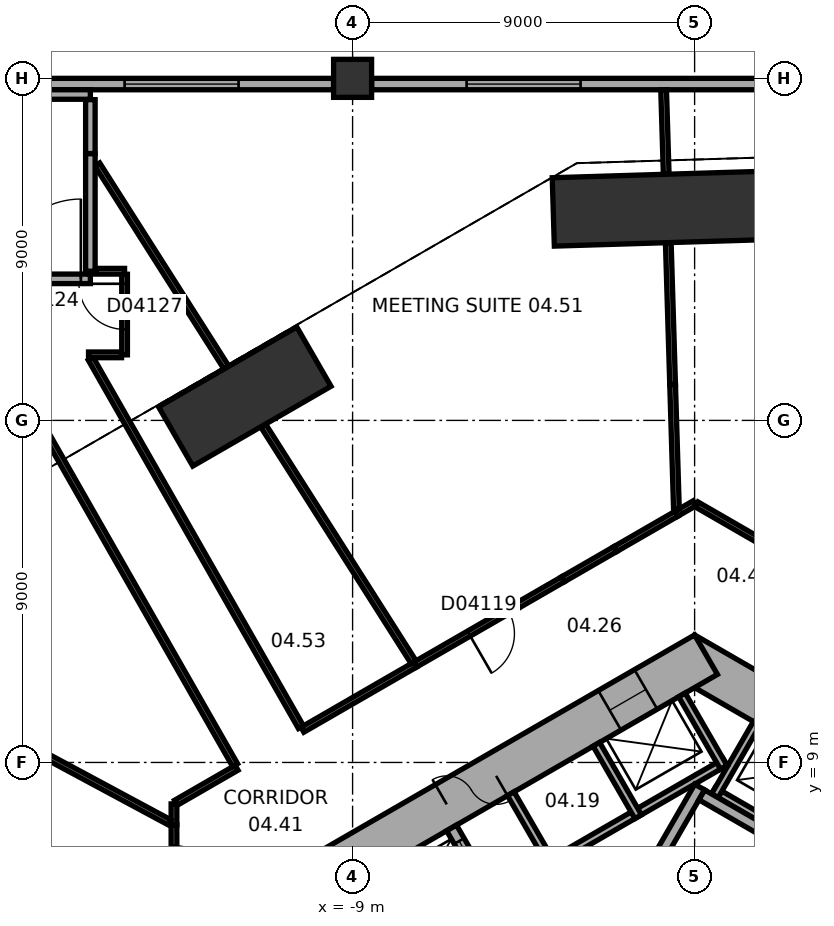
"""IFC4 building model, lengths in metres.
Left out: names, types, materials, properties, quantities, classifications, styles, units other than length and angle.
Written with IfcOpenShell. Run it as: python <this file> out.ifc"""

import sys

from ifc_helpers import new_model, si_unit, direction, frame, frame_2d, origin, origin_2d, place, context, subcontext, project, spatial, rectangle, extrude, element, fill, save


model = new_model("IFC4")
c1 = context("Model", 3, precision=1e-05, world=origin(), true_north=direction((0.0, 1.0)))
c2 = subcontext(c1, "Body", "Model", "MODEL_VIEW")
j1 = project(units=[si_unit("LENGTHUNIT", "METRE"), si_unit("PLANEANGLEUNIT", "RADIAN")], contexts=[c1])
p1 = place(None, origin())
s1 = spatial("IfcSite", under=j1, at=p1, CompositionType="ELEMENT")
p2 = place(p1, origin())
s2 = spatial("IfcBuilding", under=s1, at=p2, CompositionType="ELEMENT")
p3 = place(p2, frame((0.0, 0.0, 29.0)))
s3 = spatial("IfcBuildingStorey", under=s2, at=p3, CompositionType="ELEMENT", Elevation=29.0)
p4 = place(p3, frame((-0.72, 23.577, 0.0), z_axis=(0.0, 0.0, 1.0), x_axis=(-0.999533644135, -0.030536768695, 0.0)))
e1 = element("IfcColumn", 1, at=p4, inside=s3, PredefinedType="COLUMN", context=c2, shape_type="SweptSolid", body=[
    extrude(rectangle(XDim=6.0, YDim=1.8, at=origin_2d()), origin(), (0.0, 0.0, 1.0), 5.5),
])
p5 = place(p3, frame((-11.837, 18.627, 0.0), z_axis=(0.0, 0.0, 1.0), x_axis=(-0.866028021766, -0.499995465495, 0.0)))
e2 = element("IfcColumn", 2, at=p5, inside=s3, PredefinedType="COLUMN", context=c2, shape_type="SweptSolid", body=[
    extrude(rectangle(XDim=4.2, YDim=1.8, at=origin_2d()), origin(), (0.0, 0.0, 1.0), 5.5),
])
p6 = place(p3, frame((-9.0, 27.0, 0.0), z_axis=(0.0, 0.0, 1.0), x_axis=(1.0, 0.0, 0.0)))
e3 = element("IfcColumn", 3, at=p6, inside=s3, PredefinedType="COLUMN", context=c2, shape_type="SweptSolid", body=[
    extrude(rectangle(XDim=1.0, YDim=1.0, at=origin_2d()), origin(), (0.0, 0.0, 1.0), 5.5),
])
p7 = place(p3, frame((10.4, 5.658, 0.0), z_axis=(0.0, 0.0, 1.0), x_axis=(-0.866021384402, 0.500006961711, 0.0)))
e4 = element("IfcWall", 4, at=p7, inside=s3, PredefinedType="SHEAR", context=c2, shape_type="SweptSolid", body=[
    extrude(rectangle(XDim=12.355, YDim=1.2, at=frame_2d((6.178, 0.0))), origin(), (0.0, 0.0, 1.0), 5.5),
])
p8 = place(p7, frame((2.728, 0.0, 0.0)))
e5 = element("IfcOpeningElement", 5, at=p8, cuts=e4, PredefinedType="OPENING", context=c2, shape_type="SweptSolid", body=[
    extrude(rectangle(XDim=1.1, YDim=2.1, at=frame_2d((0.55, 1.05))), frame((0.0, 0.61, 0.0), z_axis=(0.0, -1.0, 0.0), x_axis=(1.0, 0.0, 0.0)), (0.0, 0.0, 1.0), 1.22),
])
p9 = place(p7, frame((5.328, 0.0, 0.0)))
e6 = element("IfcOpeningElement", 6, at=p9, cuts=e4, PredefinedType="OPENING", context=c2, shape_type="SweptSolid", body=[
    extrude(rectangle(XDim=1.1, YDim=2.1, at=frame_2d((0.55, 1.05))), frame((0.0, 0.61, 0.0), z_axis=(0.0, -1.0, 0.0), x_axis=(1.0, 0.0, 0.0)), (0.0, 0.0, 1.0), 1.22),
])
p10 = place(p7, frame((7.928, 0.0, 0.0)))
e7 = element("IfcOpeningElement", 7, at=p10, cuts=e4, PredefinedType="OPENING", context=c2, shape_type="SweptSolid", body=[
    extrude(rectangle(XDim=1.1, YDim=2.1, at=frame_2d((0.55, 1.05))), frame((0.0, 0.61, 0.0), z_axis=(0.0, -1.0, 0.0), x_axis=(1.0, 0.0, 0.0)), (0.0, 0.0, 1.0), 1.22),
])
p11 = place(p3, frame((0.3, 11.836, 0.0), z_axis=(0.0, 0.0, 1.0), x_axis=(-0.866021384402, -0.500006961711, 0.0)))
e8 = element("IfcWall", 8, at=p11, inside=s3, PredefinedType="SHEAR", context=c2, shape_type="SweptSolid", body=[
    extrude(rectangle(XDim=12.355, YDim=1.2, at=frame_2d((6.178, 0.0))), origin(), (0.0, 0.0, 1.0), 5.5),
])
p12 = place(p11, frame((6.378, 0.0, 0.0)))
e9 = element("IfcOpeningElement", 9, at=p12, cuts=e8, PredefinedType="OPENING", context=c2, shape_type="SweptSolid", body=[
    extrude(rectangle(XDim=1.5, YDim=2.1, at=frame_2d((0.75, 1.05))), frame((0.0, 0.61, 0.0), z_axis=(0.0, -1.0, 0.0), x_axis=(1.0, 0.0, 0.0)), (0.0, 0.0, 1.0), 1.22),
])
p13 = place(p11, frame((1.828, 0.0, 0.0)))
e10 = element("IfcOpeningElement", 10, at=p13, cuts=e8, PredefinedType="OPENING", context=c2, shape_type="SweptSolid", body=[
    extrude(rectangle(XDim=1.1, YDim=2.1, at=frame_2d((0.55, 1.05))), frame((0.0, 0.61, 0.0), z_axis=(0.0, -1.0, 0.0), x_axis=(1.0, 0.0, 0.0)), (0.0, 0.0, 1.0), 1.22),
])
p14 = place(p3, frame((8.5, 26.85, 0.0), z_axis=(0.0, 0.0, 1.0), x_axis=(-1.0, 0.0, 0.0)))
e11 = element("IfcWall", 11, at=p14, inside=s3, PredefinedType="STANDARD", context=c2, shape_type="SweptSolid", body=[
    extrude(rectangle(XDim=17.0, YDim=0.3, at=frame_2d((8.5, 0.0))), origin(), (0.0, 0.0, 1.0), 3.95),
])
p15 = place(p14, frame((2.5, 0.0, 1.0)))
e12 = element("IfcOpeningElement", 12, at=p15, cuts=e11, PredefinedType="OPENING", context=c2, shape_type="SweptSolid", body=[
    extrude(rectangle(XDim=3.0, YDim=2.6, at=frame_2d((1.5, 1.3))), frame((0.0, 0.16, 0.0), z_axis=(0.0, -1.0, 0.0), x_axis=(1.0, 0.0, 0.0)), (0.0, 0.0, 1.0), 0.32),
])
p16 = place(p14, frame((11.5, 0.0, 1.0)))
e13 = element("IfcOpeningElement", 13, at=p16, cuts=e11, PredefinedType="OPENING", context=c2, shape_type="SweptSolid", body=[
    extrude(rectangle(XDim=3.0, YDim=2.6, at=frame_2d((1.5, 1.3))), frame((0.0, 0.16, 0.0), z_axis=(0.0, -1.0, 0.0), x_axis=(1.0, 0.0, 0.0)), (0.0, 0.0, 1.0), 0.32),
])
p17 = place(p3, frame((-9.5, 26.85, 0.0), z_axis=(0.0, 0.0, 1.0), x_axis=(-1.0, 0.0, 0.0)))
e14 = element("IfcWall", 14, at=p17, inside=s3, PredefinedType="STANDARD", context=c2, shape_type="SweptSolid", body=[
    extrude(rectangle(XDim=17.0, YDim=0.3, at=frame_2d((8.5, 0.0))), origin(), (0.0, 0.0, 1.0), 3.95),
])
p18 = place(p17, frame((2.5, 0.0, 1.0)))
e15 = element("IfcOpeningElement", 15, at=p18, cuts=e14, PredefinedType="OPENING", context=c2, shape_type="SweptSolid", body=[
    extrude(rectangle(XDim=3.0, YDim=2.6, at=frame_2d((1.5, 1.3))), frame((0.0, 0.16, 0.0), z_axis=(0.0, -1.0, 0.0), x_axis=(1.0, 0.0, 0.0)), (0.0, 0.0, 1.0), 0.32),
])
p19 = place(p17, frame((11.5, 0.0, 1.0)))
e16 = element("IfcOpeningElement", 16, at=p19, cuts=e14, PredefinedType="OPENING", context=c2, shape_type="SweptSolid", body=[
    extrude(rectangle(XDim=3.0, YDim=2.6, at=frame_2d((1.5, 1.3))), frame((0.0, 0.16, 0.0), z_axis=(0.0, -1.0, 0.0), x_axis=(1.0, 0.0, 0.0)), (0.0, 0.0, 1.0), 0.32),
])
p20 = place(p3, frame((7.424, 4.259, 0.0), z_axis=(0.0, 0.0, 1.0), x_axis=(-0.866026010844, 0.49999894854, 0.0)))
e17 = element("IfcWall", 17, at=p20, inside=s3, PredefinedType="PARTITIONING", context=c2, shape_type="SweptSolid", body=[
    extrude(rectangle(XDim=8.0, YDim=0.2, at=frame_2d((4.0, 0.0))), origin(), (0.0, 0.0, 1.0), 5.15),
])
p21 = place(p3, frame((0.532, 8.122, 0.0), z_axis=(0.0, 0.0, 1.0), x_axis=(0.500077893725, 0.86598042715, 0.0)))
e18 = element("IfcWall", 18, at=p21, inside=s3, PredefinedType="PARTITIONING", context=c2, shape_type="SweptSolid", body=[
    extrude(rectangle(XDim=2.2, YDim=0.2, at=frame_2d((1.1, 0.0))), origin(), (0.0, 0.0, 1.0), 5.15),
])
p22 = place(p3, frame((0.803, 9.009, 0.0), z_axis=(0.0, 0.0, 1.0), x_axis=(-0.866028230842, -0.499995103361, 0.0)))
e19 = element("IfcWall", 19, at=p22, inside=s3, PredefinedType="PARTITIONING", context=c2, shape_type="SweptSolid", body=[
    extrude(rectangle(XDim=5.4, YDim=0.2, at=frame_2d((2.7, 0.0))), origin(), (0.0, 0.0, 1.0), 5.15),
])
p23 = place(p3, frame((0.767, 8.872, 0.0), z_axis=(0.0, 0.0, 1.0), x_axis=(-0.499994660107, 0.866028486751, 0.0)))
e20 = element("IfcWall", 20, at=p23, inside=s3, PredefinedType="PARTITIONING", context=c2, shape_type="SweptSolid", body=[
    extrude(rectangle(XDim=2.2, YDim=0.2, at=frame_2d((1.1, 0.0))), origin(), (0.0, 0.0, 1.0), 5.15),
])
for number, where, z_axis, x_axis in (
    (21, (-1.485, 7.572, 0.0), (0.0, 0.0, 1.0), (-0.5, 0.866, 0.0)),
    (22, (-3.737, 6.272, 0.0), (0.0, 0.0, 1.0), (-0.5, 0.866, 0.0)),
):
    element("IfcWall", number, at=place(p3, frame(where, z_axis=z_axis, x_axis=x_axis)), inside=s3, PredefinedType="PARTITIONING", context=c2, shape_type="SweptSolid", body=[
        extrude(rectangle(XDim=2.2, YDim=0.2, at=frame_2d((1.1, 0.0))), origin(), (0.0, 0.0, 1.0), 5.15),
    ])
p24 = place(p3, frame((-2.216, 4.282, 0.0), z_axis=(0.0, 0.0, 1.0), x_axis=(0.499977259774, 0.866038532462, 0.0)))
e23 = element("IfcWall", 23, at=p24, inside=s3, PredefinedType="SHEAR", context=c2, shape_type="SweptSolid", body=[
    extrude(rectangle(XDim=4.7, YDim=0.3, at=frame_2d((2.35, 0.0))), origin(), (0.0, 0.0, 1.0), 5.15),
])
p25 = place(p3, frame((6.303, 4.617, 0.0), z_axis=(0.0, 0.0, 1.0), x_axis=(-0.866027801685, 0.499995846692, 0.0)))
e24 = element("IfcWall", 24, at=p25, inside=s3, PredefinedType="SHEAR", context=c2, shape_type="SweptSolid", body=[
    extrude(rectangle(XDim=7.06, YDim=0.3, at=frame_2d((3.53, 0.0))), origin(), (0.0, 0.0, 1.0), 5.15),
])
p26 = place(p3, frame((-5.295, 5.372, 0.0), z_axis=(0.0, 0.0, 1.0), x_axis=(-0.500077893725, 0.86598042715, 0.0)))
e25 = element("IfcWall", 25, at=p26, inside=s3, PredefinedType="SHEAR", context=c2, shape_type="SweptSolid", body=[
    extrude(rectangle(XDim=2.2, YDim=0.3, at=frame_2d((1.1, 0.0))), origin(), (0.0, 0.0, 1.0), 5.15),
])
p27 = place(p26, frame((0.7, 0.0, 0.0)))
e26 = element("IfcOpeningElement", 26, at=p27, cuts=e25, PredefinedType="OPENING", context=c2, shape_type="SweptSolid", body=[
    extrude(rectangle(XDim=1.1, YDim=2.1, at=frame_2d((0.55, 1.05))), frame((0.0, 0.16, 0.0), z_axis=(0.0, -1.0, 0.0), x_axis=(1.0, 0.0, 0.0)), (0.0, 0.0, 1.0), 0.32),
])
p28 = place(p3, frame((-13.7, -0.255, 0.0), z_axis=(0.0, 0.0, 1.0), x_axis=(0.0, 1.0, 0.0)))
e27 = element("IfcWall", 27, at=p28, inside=s3, PredefinedType="PARTITIONING", context=c2, shape_type="SweptSolid", body=[
    extrude(rectangle(XDim=7.616, YDim=0.15, at=frame_2d((3.808, 0.0))), origin(), (0.0, 0.0, 1.0), 5.15),
])
p29 = place(p28, frame((5.866, 0.0, 0.0)))
e28 = element("IfcOpeningElement", 28, at=p29, cuts=e27, PredefinedType="OPENING", context=c2, shape_type="SweptSolid", body=[
    extrude(rectangle(XDim=1.2, YDim=2.1, at=frame_2d((0.6, 1.05))), frame((0.0, 0.085, 0.0), z_axis=(0.0, -1.0, 0.0), x_axis=(1.0, 0.0, 0.0)), (0.0, 0.0, 1.0), 0.17),
])
p30 = place(p3, frame((-13.7, 7.362, 0.0), z_axis=(0.0, 0.0, 1.0), x_axis=(0.0, 1.0, 0.0)))
e29 = element("IfcWall", 29, at=p30, inside=s3, PredefinedType="PARTITIONING", context=c2, shape_type="SweptSolid", body=[
    extrude(rectangle(XDim=0.548, YDim=0.15, at=frame_2d((0.274, 0.0))), origin(), (0.0, 0.0, 1.0), 5.15),
])
p31 = place(p3, frame((-13.806, 7.418, 0.0), z_axis=(0.0, 0.0, 1.0), x_axis=(-0.880891557551, 0.473318142305, 0.0)))
e30 = element("IfcWall", 30, at=p31, inside=s3, PredefinedType="PARTITIONING", context=c2, shape_type="SweptSolid", body=[
    extrude(rectangle(XDim=7.787, YDim=0.15, at=frame_2d((3.894, 0.0))), origin(), (0.0, 0.0, 1.0), 5.15),
])
p32 = place(p3, frame((-13.648, 7.939, 0.0), z_axis=(0.0, 0.0, 1.0), x_axis=(0.866024486176, 0.500001589341, 0.0)))
e31 = element("IfcWall", 31, at=p32, inside=s3, PredefinedType="PARTITIONING", context=c2, shape_type="SweptSolid", body=[
    extrude(rectangle(XDim=1.842, YDim=0.15, at=frame_2d((0.921, 0.0))), origin(), (0.0, 0.0, 1.0), 5.15),
])
p33 = place(p3, frame((-12.092, 8.93, 0.0), z_axis=(0.0, 0.0, 1.0), x_axis=(-0.495564220718, 0.868571299977, 0.0)))
e32 = element("IfcWall", 32, at=p33, inside=s3, PredefinedType="PARTITIONING", context=c2, shape_type="SweptSolid", body=[
    extrude(rectangle(XDim=11.988, YDim=0.15, at=frame_2d((5.994, 0.0))), origin(), (0.0, 0.0, 1.0), 5.15),
])
p34 = place(p3, frame((-10.321, 9.861, 0.0), z_axis=(0.0, 0.0, 1.0), x_axis=(0.865970719175, 0.500094704563, 0.0)))
e33 = element("IfcWall", 33, at=p34, inside=s3, PredefinedType="PARTITIONING", context=c2, shape_type="SweptSolid", body=[
    extrude(rectangle(XDim=3.425, YDim=0.15, at=frame_2d((1.712, 0.0))), origin(), (0.0, 0.0, 1.0), 5.15),
])
p35 = place(p3, frame((-7.354, 11.573, 0.0), z_axis=(0.0, 0.0, 1.0), x_axis=(0.866051051954, 0.499955573435, 0.0)))
e34 = element("IfcWall", 34, at=p35, inside=s3, PredefinedType="PARTITIONING", context=c2, shape_type="SweptSolid", body=[
    extrude(rectangle(XDim=3.082, YDim=0.15, at=frame_2d((1.541, 0.0))), origin(), (0.0, 0.0, 1.0), 5.15),
])
p36 = place(p35, frame((1.632, 0.0, 0.0)))
e35 = element("IfcOpeningElement", 35, at=p36, cuts=e34, PredefinedType="OPENING", context=c2, shape_type="SweptSolid", body=[
    extrude(rectangle(XDim=1.2, YDim=2.1, at=frame_2d((0.6, 1.05))), frame((0.0, 0.085, 0.0), z_axis=(0.0, -1.0, 0.0), x_axis=(1.0, 0.0, 0.0)), (0.0, 0.0, 1.0), 0.17),
])
p37 = place(p3, frame((-7.397, 11.641, 0.0), z_axis=(0.0, 0.0, 1.0), x_axis=(-0.536312130721, 0.844019726334, 0.0)))
e36 = element("IfcWall", 36, at=p37, inside=s3, PredefinedType="PARTITIONING", context=c2, shape_type="SweptSolid", body=[
    extrude(rectangle(XDim=7.376, YDim=0.15, at=frame_2d((3.688, 0.0))), origin(), (0.0, 0.0, 1.0), 5.15),
])
p38 = place(p3, frame((-3.46, 13.822, 0.0), z_axis=(0.0, 0.0, 1.0), x_axis=(-0.866004557827, -0.500036104519, 0.0)))
e37 = element("IfcWall", 37, at=p38, inside=s3, PredefinedType="PARTITIONING", context=c2, shape_type="SweptSolid", body=[
    extrude(rectangle(XDim=1.415, YDim=0.15, at=frame_2d((0.708, 0.0))), origin(), (0.0, 0.0, 1.0), 5.15),
])
p39 = place(p3, frame((3.386, 13.865, 0.0), z_axis=(0.0, 0.0, 1.0), x_axis=(-0.866006051527, 0.500033517596, 0.0)))
e38 = element("IfcWall", 38, at=p39, inside=s3, PredefinedType="PARTITIONING", context=c2, shape_type="SweptSolid", body=[
    extrude(rectangle(XDim=3.85, YDim=0.15, at=frame_2d((1.925, 0.0))), origin(), (0.0, 0.0, 1.0), 5.15),
])
p40 = place(p3, frame((-2.087, 14.615, 0.0), z_axis=(0.0, 0.0, 1.0), x_axis=(-0.866054784643, -0.499949107407, 0.0)))
e39 = element("IfcWall", 39, at=p40, inside=s3, PredefinedType="PARTITIONING", context=c2, shape_type="SweptSolid", body=[
    extrude(rectangle(XDim=1.585, YDim=0.15, at=frame_2d((0.792, 0.0))), origin(), (0.0, 0.0, 1.0), 5.15),
])
p41 = place(p3, frame((-2.087, 14.615, 0.0), z_axis=(0.0, 0.0, 1.0), x_axis=(0.866006459158, 0.500032811619, 0.0)))
e40 = element("IfcWall", 40, at=p41, inside=s3, PredefinedType="PARTITIONING", context=c2, shape_type="SweptSolid", body=[
    extrude(rectangle(XDim=1.861, YDim=0.15, at=frame_2d((0.931, 0.0))), origin(), (0.0, 0.0, 1.0), 5.15),
])
p42 = place(p3, frame((-0.475, 15.545, 0.0), z_axis=(0.0, 0.0, 1.0), x_axis=(0.865933599817, 0.500158975434, 0.0)))
e41 = element("IfcWall", 41, at=p42, inside=s3, PredefinedType="PARTITIONING", context=c2, shape_type="SweptSolid", body=[
    extrude(rectangle(XDim=0.549, YDim=0.15, at=frame_2d((0.274, 0.0))), origin(), (0.0, 0.0, 1.0), 5.15),
])
p43 = place(p3, frame((-0.579, 18.946, 0.0), z_axis=(0.0, 0.0, 1.0), x_axis=(0.030572886356, -0.999532540051, 0.0)))
e42 = element("IfcWall", 42, at=p43, inside=s3, PredefinedType="PARTITIONING", context=c2, shape_type="SweptSolid", body=[
    extrude(rectangle(XDim=3.282, YDim=0.15, at=frame_2d((1.641, 0.0))), origin(), (0.0, 0.0, 1.0), 5.15),
])
p44 = place(p3, frame((-0.579, 18.946, 0.0), z_axis=(0.0, 0.0, 1.0), x_axis=(-0.030471255388, 0.999535643484, 0.0)))
e43 = element("IfcWall", 43, at=p44, inside=s3, PredefinedType="PARTITIONING", context=c2, shape_type="SweptSolid", body=[
    extrude(rectangle(XDim=3.734, YDim=0.15, at=frame_2d((1.867, 0.0))), origin(), (0.0, 0.0, 1.0), 5.15),
])
p45 = place(p3, frame((-12.32, 19.387, 0.0), z_axis=(0.0, 0.0, 1.0), x_axis=(-0.536309341483, 0.844021498682, 0.0)))
e44 = element("IfcWall", 44, at=p45, inside=s3, PredefinedType="PARTITIONING", context=c2, shape_type="SweptSolid", body=[
    extrude(rectangle(XDim=6.335, YDim=0.15, at=frame_2d((3.168, 0.0))), origin(), (0.0, 0.0, 1.0), 5.15),
])
p46 = place(p3, frame((-15.889, 19.621, 0.0), z_axis=(0.0, 0.0, 1.0), x_axis=(0.495540263005, -0.868584968636, 0.0)))
e45 = element("IfcWall", 45, at=p46, inside=s3, PredefinedType="PARTITIONING", context=c2, shape_type="SweptSolid", body=[
    extrude(rectangle(XDim=11.157, YDim=0.15, at=frame_2d((5.579, 0.0))), origin(), (0.0, 0.0, 1.0), 5.15),
])
p47 = place(p3, frame((-15.08, 19.725, 0.0), z_axis=(0.0, 0.0, 1.0), x_axis=(-1.0, 0.0, 0.0)))
e46 = element("IfcWall", 46, at=p47, inside=s3, PredefinedType="PARTITIONING", context=c2, shape_type="SweptSolid", body=[
    extrude(rectangle(XDim=0.868, YDim=0.15, at=frame_2d((0.434, 0.0))), origin(), (0.0, 0.0, 1.0), 5.15),
])
p48 = place(p3, frame((-15.9, 21.725, 0.0), z_axis=(0.0, 0.0, 1.0), x_axis=(-1.0, 0.0, 0.0)))
e47 = element("IfcWall", 47, at=p48, inside=s3, PredefinedType="SOLIDWALL", context=c2, shape_type="SweptSolid", body=[
    extrude(rectangle(XDim=3.3, YDim=0.25, at=frame_2d((1.65, 0.0))), origin(), (0.0, 0.0, 1.0), 5.15),
])
p49 = place(p48, frame((0.25, 0.0, 0.0)))
e48 = element("IfcOpeningElement", 48, at=p49, cuts=e47, PredefinedType="OPENING", context=c2, shape_type="SweptSolid", body=[
    extrude(rectangle(XDim=2.1, YDim=2.4, at=frame_2d((1.05, 1.2))), frame((0.0, 0.135, 0.0), z_axis=(0.0, -1.0, 0.0), x_axis=(1.0, 0.0, 0.0)), (0.0, 0.0, 1.0), 0.27),
])
p50 = place(p3, frame((-15.0, 21.845, 0.0), z_axis=(0.0, 0.0, 1.0), x_axis=(0.0, -1.0, 0.0)))
e49 = element("IfcWall", 49, at=p50, inside=s3, PredefinedType="PARTITIONING", context=c2, shape_type="SweptSolid", body=[
    extrude(rectangle(XDim=2.12, YDim=0.15, at=frame_2d((1.06, 0.0))), origin(), (0.0, 0.0, 1.0), 5.15),
])
p51 = place(p50, frame((0.25, 0.0, 0.0)))
e50 = element("IfcOpeningElement", 50, at=p51, cuts=e49, PredefinedType="OPENING", context=c2, shape_type="SweptSolid", body=[
    extrude(rectangle(XDim=1.2, YDim=2.1, at=frame_2d((0.6, 1.05))), frame((0.0, 0.085, 0.0), z_axis=(0.0, -1.0, 0.0), x_axis=(1.0, 0.0, 0.0)), (0.0, 0.0, 1.0), 0.17),
])
p52 = place(p3, frame((-15.76, 21.925, 0.0), z_axis=(0.0, 0.0, 1.0), x_axis=(1.0, 0.0, 0.0)))
e51 = element("IfcWall", 51, at=p52, inside=s3, PredefinedType="PARTITIONING", context=c2, shape_type="SweptSolid", body=[
    extrude(rectangle(XDim=0.76, YDim=0.15, at=frame_2d((0.38, 0.0))), origin(), (0.0, 0.0, 1.0), 5.15),
])
p53 = place(p3, frame((-0.748, 24.477, 0.0), z_axis=(0.0, 0.0, 1.0), x_axis=(-0.030405439098, 0.999537647752, 0.0)))
e52 = element("IfcWall", 52, at=p53, inside=s3, PredefinedType="PARTITIONING", context=c2, shape_type="SweptSolid", body=[
    extrude(rectangle(XDim=2.224, YDim=0.15, at=frame_2d((1.112, 0.0))), origin(), (0.0, 0.0, 1.0), 5.15),
])
p54 = place(p3, frame((-15.9, 25.021, 0.0), z_axis=(0.0, 0.0, 1.0), x_axis=(0.0, -1.0, 0.0)))
e53 = element("IfcWall", 53, at=p54, inside=s3, PredefinedType="SOLIDWALL", context=c2, shape_type="SweptSolid", body=[
    extrude(rectangle(XDim=3.096, YDim=0.25, at=frame_2d((1.548, 0.0))), origin(), (0.0, 0.0, 1.0), 5.15),
])
p55 = place(p3, frame((-15.9, 26.44, 0.0), z_axis=(0.0, 0.0, 1.0), x_axis=(0.0, -1.0, 0.0)))
e54 = element("IfcWall", 54, at=p55, inside=s3, PredefinedType="SOLIDWALL", context=c2, shape_type="SweptSolid", body=[
    extrude(rectangle(XDim=1.418, YDim=0.25, at=frame_2d((0.709, 0.0))), origin(), (0.0, 0.0, 1.0), 5.15),
])
p56 = place(p3, frame((-26.45, 26.575, 0.0), z_axis=(0.0, 0.0, 1.0), x_axis=(1.0, 0.0, 0.0)))
e55 = element("IfcWall", 55, at=p56, inside=s3, PredefinedType="SOLIDWALL", context=c2, shape_type="SweptSolid", body=[
    extrude(rectangle(XDim=10.55, YDim=0.25, at=frame_2d((5.275, 0.0))), origin(), (0.0, 0.0, 1.0), 5.15),
])
p57 = place(p16, origin())
e56 = element("IfcWindow", 56, at=p57, inside=s3, PartitioningType="SINGLE_PANEL", PredefinedType="WINDOW", context=c2, shape_type="SweptSolid", body=[
    extrude(rectangle(XDim=3.0, YDim=2.6, at=frame_2d((1.5, 1.3))), frame((0.0, 0.03, 0.0), z_axis=(0.0, -1.0, 0.0), x_axis=(1.0, 0.0, 0.0)), (0.0, 0.0, 1.0), 0.06),
])
fill(e13, e56)
p58 = place(p18, origin())
e57 = element("IfcWindow", 57, at=p58, inside=s3, PartitioningType="SINGLE_PANEL", PredefinedType="WINDOW", context=c2, shape_type="SweptSolid", body=[
    extrude(rectangle(XDim=3.0, YDim=2.6, at=frame_2d((1.5, 1.3))), frame((0.0, 0.03, 0.0), z_axis=(0.0, -1.0, 0.0), x_axis=(1.0, 0.0, 0.0)), (0.0, 0.0, 1.0), 0.06),
])
fill(e15, e57)
p59 = place(p12, origin())
e58 = element("IfcDoor", 58, at=p59, inside=s3, OperationType="DOUBLE_DOOR_SINGLE_SWING", PredefinedType="DOOR", context=c2, shape_type="SweptSolid", body=[
    extrude(rectangle(XDim=1.5, YDim=2.1, at=frame_2d((0.75, 1.05))), frame((0.0, 0.025, 0.0), z_axis=(0.0, -1.0, 0.0), x_axis=(1.0, 0.0, 0.0)), (0.0, 0.0, 1.0), 0.05),
])
fill(e9, e58)
p60 = place(p27, origin())
e59 = element("IfcDoor", 59, at=p60, inside=s3, OperationType="DOUBLE_DOOR_SLIDING", PredefinedType="DOOR", context=c2, shape_type="SweptSolid", body=[
    extrude(rectangle(XDim=1.1, YDim=2.1, at=frame_2d((0.55, 1.05))), frame((0.0, 0.025, 0.0), z_axis=(0.0, -1.0, 0.0), x_axis=(1.0, 0.0, 0.0)), (0.0, 0.0, 1.0), 0.05),
])
fill(e26, e59)
p61 = place(p13, origin())
e60 = element("IfcDoor", 60, at=p61, inside=s3, OperationType="DOUBLE_DOOR_SLIDING", PredefinedType="DOOR", context=c2, shape_type="SweptSolid", body=[
    extrude(rectangle(XDim=1.1, YDim=2.1, at=frame_2d((0.55, 1.05))), frame((0.0, 0.025, 0.0), z_axis=(0.0, -1.0, 0.0), x_axis=(1.0, 0.0, 0.0)), (0.0, 0.0, 1.0), 0.05),
])
fill(e10, e60)
p62 = place(p29, origin())
e61 = element("IfcDoor", 61, at=p62, inside=s3, OperationType="SINGLE_SWING_LEFT", PredefinedType="DOOR", context=c2, shape_type="SweptSolid", body=[
    extrude(rectangle(XDim=1.2, YDim=2.1, at=frame_2d((0.6, 1.05))), frame((0.0, 0.025, 0.0), z_axis=(0.0, -1.0, 0.0), x_axis=(1.0, 0.0, 0.0)), (0.0, 0.0, 1.0), 0.05),
])
fill(e28, e61)
p63 = place(p36, origin())
e62 = element("IfcDoor", 62, at=p63, inside=s3, OperationType="SINGLE_SWING_LEFT", PredefinedType="DOOR", context=c2, shape_type="SweptSolid", body=[
    extrude(rectangle(XDim=1.2, YDim=2.1, at=frame_2d((0.6, 1.05))), frame((0.0, 0.025, 0.0), z_axis=(0.0, -1.0, 0.0), x_axis=(1.0, 0.0, 0.0)), (0.0, 0.0, 1.0), 0.05),
])
fill(e35, e62)
p64 = place(p49, frame((2.1, 0.0, 0.0), z_axis=(0.0, 0.0, 1.0), x_axis=(-1.0, 0.0, 0.0)))
e63 = element("IfcDoor", 63, at=p64, inside=s3, OperationType="DOUBLE_DOOR_SINGLE_SWING", PredefinedType="DOOR", context=c2, shape_type="SweptSolid", body=[
    extrude(rectangle(XDim=2.1, YDim=2.4, at=frame_2d((1.05, 1.2))), frame((0.0, 0.025, 0.0), z_axis=(0.0, -1.0, 0.0), x_axis=(1.0, 0.0, 0.0)), (0.0, 0.0, 1.0), 0.05),
])
fill(e48, e63)
p65 = place(p51, origin())
e64 = element("IfcDoor", 64, at=p65, inside=s3, OperationType="SINGLE_SWING_LEFT", PredefinedType="DOOR", context=c2, shape_type="SweptSolid", body=[
    extrude(rectangle(XDim=1.2, YDim=2.1, at=frame_2d((0.6, 1.05))), frame((0.0, 0.025, 0.0), z_axis=(0.0, -1.0, 0.0), x_axis=(1.0, 0.0, 0.0)), (0.0, 0.0, 1.0), 0.05),
])
fill(e50, e64)
save(model, sys.argv[1])
